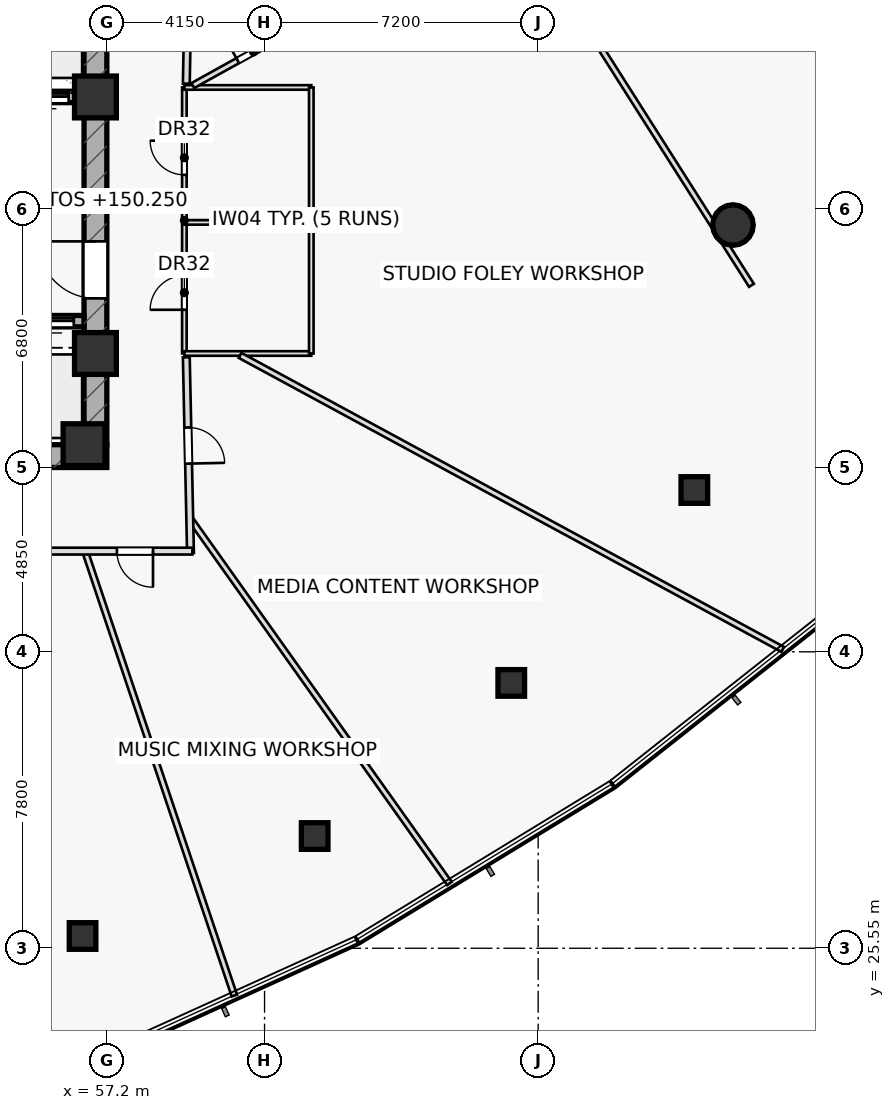
"""IFC4 building model, lengths in metres.
Left out: names, types, materials, properties, quantities, classifications, styles, units other than length and angle.
Written with IfcOpenShell. Run it as: python <this file> out.ifc"""

import sys

from ifc_helpers import new_model, si_unit, direction, frame, frame_2d, origin, origin_2d, place, context, subcontext, project, spatial, rectangle, hollow_rectangle, hollow_circle, extrude, element, fill, save


model = new_model("IFC4")
c1 = context("Model", 3, precision=1e-05, world=origin(), true_north=direction((0.0, 1.0)))
c2 = subcontext(c1, "Body", "Model", "MODEL_VIEW")
j1 = project(units=[si_unit("LENGTHUNIT", "METRE"), si_unit("PLANEANGLEUNIT", "RADIAN")], contexts=[c1])
p1 = place(None, origin())
s1 = spatial("IfcSite", under=j1, at=p1, CompositionType="ELEMENT")
p2 = place(p1, origin())
s2 = spatial("IfcBuilding", under=s1, at=p2, CompositionType="ELEMENT")
p3 = place(p2, frame((0.0, 0.0, 150.25)))
s3 = spatial("IfcBuildingStorey", under=s2, at=p3, CompositionType="ELEMENT", Elevation=150.25)
p4 = place(p3, frame((42.8, 38.5, 0.0), z_axis=(0.0, 0.0, 1.0), x_axis=(1.0, 0.0, 0.0)))
e1 = element("IfcWall", 1, at=p4, inside=s3, PredefinedType="SHEAR", context=c2, shape_type="SweptSolid", body=[
    extrude(rectangle(XDim=14.4, YDim=0.6, at=frame_2d((7.2, 0.0))), origin(), (0.0, 0.0, 1.0), 3.55),
])
p5 = place(p4, frame((0.88, 0.0, 0.0)))
e2 = element("IfcOpeningElement", 2, at=p5, cuts=e1, PredefinedType="OPENING", context=c2, shape_type="SweptSolid", body=[
    extrude(rectangle(XDim=1.05, YDim=2.2, at=frame_2d((0.525, 1.1))), frame((0.0, 0.31, 0.0), z_axis=(0.0, -1.0, 0.0), x_axis=(1.0, 0.0, 0.0)), (0.0, 0.0, 1.0), 0.62),
])
p6 = place(p3, frame((56.9, 38.8, 0.0), z_axis=(0.0, 0.0, 1.0), x_axis=(0.0, 1.0, 0.0)))
e3 = element("IfcWall", 3, at=p6, inside=s3, PredefinedType="SHEAR", context=c2, shape_type="SweptSolid", body=[
    extrude(rectangle(XDim=12.4, YDim=0.6, at=frame_2d((6.2, 0.0))), origin(), (0.0, 0.0, 1.0), 3.55),
])
p7 = place(p6, frame((3.85, 0.0, 0.0)))
e4 = element("IfcOpeningElement", 4, at=p7, cuts=e3, PredefinedType="OPENING", context=c2, shape_type="SweptSolid", body=[
    extrude(rectangle(XDim=1.5, YDim=2.2, at=frame_2d((0.75, 1.1))), frame((0.0, 0.31, 0.0), z_axis=(0.0, -1.0, 0.0), x_axis=(1.0, 0.0, 0.0)), (0.0, 0.0, 1.0), 0.62),
])
p8 = place(p3, frame((43.4, 47.95, 0.0), z_axis=(0.0, 0.0, 1.0), x_axis=(1.0, 0.0, 0.0)))
e5 = element("IfcWall", 5, at=p8, inside=s3, PredefinedType="SHEAR", context=c2, shape_type="SweptSolid", body=[
    extrude(rectangle(XDim=13.2, YDim=0.3, at=frame_2d((6.6, 0.0))), origin(), (0.0, 0.0, 1.0), 3.55),
])
p9 = place(p8, frame((8.345, 0.0, 0.0)))
e6 = element("IfcOpeningElement", 6, at=p9, cuts=e5, PredefinedType="OPENING", context=c2, shape_type="SweptSolid", body=[
    extrude(rectangle(XDim=1.15, YDim=2.2, at=frame_2d((0.575, 1.1))), frame((0.0, 0.16, 0.0), z_axis=(0.0, -1.0, 0.0), x_axis=(1.0, 0.0, 0.0)), (0.0, 0.0, 1.0), 0.32),
])
p10 = place(p8, frame((10.065, 0.0, 0.0)))
e7 = element("IfcOpeningElement", 7, at=p10, cuts=e5, PredefinedType="OPENING", context=c2, shape_type="SweptSolid", body=[
    extrude(rectangle(XDim=1.15, YDim=2.2, at=frame_2d((0.575, 1.1))), frame((0.0, 0.16, 0.0), z_axis=(0.0, -1.0, 0.0), x_axis=(1.0, 0.0, 0.0)), (0.0, 0.0, 1.0), 0.32),
])
p11 = place(p8, frame((11.645, 0.0, 0.0)))
e8 = element("IfcOpeningElement", 8, at=p11, cuts=e5, PredefinedType="OPENING", context=c2, shape_type="SweptSolid", body=[
    extrude(rectangle(XDim=1.15, YDim=2.2, at=frame_2d((0.575, 1.1))), frame((0.0, 0.16, 0.0), z_axis=(0.0, -1.0, 0.0), x_axis=(1.0, 0.0, 0.0)), (0.0, 0.0, 1.0), 0.32),
])
p12 = place(p3, frame((43.4, 42.05, 0.0), z_axis=(0.0, 0.0, 1.0), x_axis=(1.0, 0.0, 0.0)))
e9 = element("IfcWall", 9, at=p12, inside=s3, PredefinedType="SHEAR", context=c2, shape_type="SweptSolid", body=[
    extrude(rectangle(XDim=13.2, YDim=0.3, at=frame_2d((6.6, 0.0))), origin(), (0.0, 0.0, 1.0), 3.55),
])
p13 = place(p12, frame((8.37, 0.0, 0.0)))
e10 = element("IfcOpeningElement", 10, at=p13, cuts=e9, PredefinedType="OPENING", context=c2, shape_type="SweptSolid", body=[
    extrude(rectangle(XDim=1.1, YDim=2.15, at=frame_2d((0.55, 1.075))), frame((0.0, 0.16, 0.0), z_axis=(0.0, -1.0, 0.0), x_axis=(1.0, 0.0, 0.0)), (0.0, 0.0, 1.0), 0.32),
])
p14 = place(p12, frame((10.09, 0.0, 0.0)))
e11 = element("IfcOpeningElement", 11, at=p14, cuts=e9, PredefinedType="OPENING", context=c2, shape_type="SweptSolid", body=[
    extrude(rectangle(XDim=1.1, YDim=2.15, at=frame_2d((0.55, 1.075))), frame((0.0, 0.16, 0.0), z_axis=(0.0, -1.0, 0.0), x_axis=(1.0, 0.0, 0.0)), (0.0, 0.0, 1.0), 0.32),
])
p15 = place(p12, frame((11.83, 0.0, 0.0)))
e12 = element("IfcOpeningElement", 12, at=p15, cuts=e9, PredefinedType="OPENING", context=c2, shape_type="SweptSolid", body=[
    extrude(rectangle(XDim=1.1, YDim=2.15, at=frame_2d((0.55, 1.075))), frame((0.0, 0.16, 0.0), z_axis=(0.0, -1.0, 0.0), x_axis=(1.0, 0.0, 0.0)), (0.0, 0.0, 1.0), 0.32),
])
for number, where, z_axis, x_axis in (
    (13, (56.9, 47.95, 0.0), (0.0, 0.0, 1.0), (1.0, 0.0, 0.0)),
    (14, (56.9, 41.2, 0.0), (0.0, 0.0, 1.0), (1.0, 0.0, 0.0)),
    (15, (56.6, 38.8, 0.0), (0.0, 0.0, 1.0), (1.0, 0.0, 0.0)),
):
    element("IfcColumn", number, at=place(p3, frame(where, z_axis=z_axis, x_axis=x_axis)), inside=s3, PredefinedType="COLUMN", context=c2, shape_type="SweptSolid", body=[
        extrude(rectangle(XDim=1.1, YDim=1.1, at=origin_2d()), origin(), (0.0, 0.0, 1.0), 3.55),
    ])
for number, where, z_axis, x_axis in (
    (16, (56.561, 25.873, 0.0), (0.0, 0.0, 1.0), (1.0, 0.0, 0.0)),
    (17, (62.669, 28.503, 0.0), (0.0, 0.0, 1.0), (1.0, 0.0, 0.0)),
    (18, (67.842, 32.532, 0.0), (0.0, 0.0, 1.0), (1.0, 0.0, 0.0)),
    (19, (72.659, 37.607, 0.0), (0.0, 0.0, 1.0), (1.0, 0.0, 0.0)),
):
    element("IfcColumn", number, at=place(p3, frame(where, z_axis=z_axis, x_axis=x_axis)), inside=s3, PredefinedType="COLUMN", context=c2, shape_type="SweptSolid", body=[
        extrude(hollow_rectangle(XDim=0.7, YDim=0.7, WallThickness=0.04, at=origin_2d()), origin(), (0.0, 0.0, 1.0), 3.55),
    ])
p16 = place(p3, frame((73.676, 44.58, 0.0), z_axis=(0.0, 0.0, 1.0), x_axis=(1.0, 0.0, 0.0)))
e20 = element("IfcColumn", 20, at=p16, inside=s3, PredefinedType="COLUMN", context=c2, shape_type="SweptSolid", body=[
    extrude(hollow_circle(Radius=0.533, WallThickness=0.045, at=origin_2d()), origin(), (0.0, 0.0, 1.0), 3.55),
])
p17 = place(p3, frame((50.65, 45.05, 0.0), z_axis=(0.0, 0.0, 1.0), x_axis=(1.0, 0.0, 0.0)))
e21 = element("IfcWall", 21, at=p17, inside=s3, PredefinedType="PARTITIONING", context=c2, shape_type="SweptSolid", body=[
    extrude(rectangle(XDim=5.95, YDim=0.2, at=frame_2d((2.975, 0.0))), origin(), (0.0, 0.0, 1.0), 3.55),
])
p18 = place(p17, frame((1.35, 0.0, 0.0)))
e22 = element("IfcOpeningElement", 22, at=p18, cuts=e21, PredefinedType="OPENING", context=c2, shape_type="SweptSolid", body=[
    extrude(rectangle(XDim=1.5, YDim=2.2, at=frame_2d((0.75, 1.1))), frame((0.0, 0.11, 0.0), z_axis=(0.0, -1.0, 0.0), x_axis=(1.0, 0.0, 0.0)), (0.0, 0.0, 1.0), 0.22),
])
p19 = place(p3, frame((74.163, 42.993, 0.0), z_axis=(0.0, 0.0, 1.0), x_axis=(-0.53628142437, 0.844039237166, 0.0)))
e23 = element("IfcWall", 23, at=p19, inside=s3, PredefinedType="PARTITIONING", context=c2, shape_type="SweptSolid", body=[
    extrude(rectangle(XDim=10.267, YDim=0.15, at=frame_2d((5.133, 0.0))), origin(), (0.0, 0.0, 1.0), 2.835),
])
p20 = place(p3, frame((59.24, 41.2, 0.0), z_axis=(0.0, 0.0, 1.0), x_axis=(0.0, 1.0, 0.0)))
e24 = element("IfcWall", 24, at=p20, inside=s3, PredefinedType="PARTITIONING", context=c2, shape_type="SweptSolid", body=[
    extrude(rectangle(XDim=7.0, YDim=0.12, at=frame_2d((3.5, 0.0))), origin(), (0.0, 0.0, 1.0), 3.55),
])
p21 = place(p20, frame((1.15, 0.0, 0.0)))
e25 = element("IfcOpeningElement", 25, at=p21, cuts=e24, PredefinedType="OPENING", context=c2, shape_type="SweptSolid", body=[
    extrude(rectangle(XDim=0.9, YDim=2.05, at=frame_2d((0.45, 1.025))), frame((0.0, 0.07, 0.0), z_axis=(0.0, -1.0, 0.0), x_axis=(1.0, 0.0, 0.0)), (0.0, 0.0, 1.0), 0.14),
])
p22 = place(p20, frame((4.7, 0.0, 0.0)))
e26 = element("IfcOpeningElement", 26, at=p22, cuts=e24, PredefinedType="OPENING", context=c2, shape_type="SweptSolid", body=[
    extrude(rectangle(XDim=0.9, YDim=2.05, at=frame_2d((0.45, 1.025))), frame((0.0, 0.07, 0.0), z_axis=(0.0, -1.0, 0.0), x_axis=(1.0, 0.0, 0.0)), (0.0, 0.0, 1.0), 0.14),
])
for number, where, z_axis, x_axis in (
    (27, (59.24, 41.2, 0.0), (0.0, 0.0, 1.0), (1.0, 0.0, 0.0)),
    (28, (59.24, 44.65, 0.0), (0.0, 0.0, 1.0), (1.0, 0.0, 0.0)),
    (29, (59.24, 48.2, 0.0), (0.0, 0.0, 1.0), (1.0, 0.0, 0.0)),
):
    element("IfcWall", number, at=place(p3, frame(where, z_axis=z_axis, x_axis=x_axis)), inside=s3, PredefinedType="PARTITIONING", context=c2, shape_type="SweptSolid", body=[
        extrude(rectangle(XDim=3.34, YDim=0.12, at=frame_2d((1.67, 0.0))), origin(), (0.0, 0.0, 1.0), 3.55),
    ])
p23 = place(p3, frame((62.58, 41.2, 0.0), z_axis=(0.0, 0.0, 1.0), x_axis=(0.0, 1.0, 0.0)))
e30 = element("IfcWall", 30, at=p23, inside=s3, PredefinedType="PARTITIONING", context=c2, shape_type="SweptSolid", body=[
    extrude(rectangle(XDim=7.0, YDim=0.12, at=frame_2d((3.5, 0.0))), origin(), (0.0, 0.0, 1.0), 3.55),
])
p24 = place(p3, frame((59.463, 48.25, 0.0), z_axis=(0.0, 0.0, 1.0), x_axis=(0.87461815062, 0.48481242827, 0.0)))
e31 = element("IfcWall", 31, at=p24, inside=s3, PredefinedType="PARTITIONING", context=c2, shape_type="SweptSolid", body=[
    extrude(rectangle(XDim=17.901, YDim=0.15, at=frame_2d((8.95, 0.0))), origin(), (0.0, 0.0, 1.0), 2.835),
])
p25 = place(p24, frame((1.35, 0.0, 0.0)))
e32 = element("IfcOpeningElement", 32, at=p25, cuts=e31, PredefinedType="OPENING", context=c2, shape_type="SweptSolid", body=[
    extrude(rectangle(XDim=0.95, YDim=2.05, at=frame_2d((0.475, 1.025))), frame((0.0, 0.085, 0.0), z_axis=(0.0, -1.0, 0.0), x_axis=(1.0, 0.0, 0.0)), (0.0, 0.0, 1.0), 0.17),
])
p26 = place(p3, frame((56.625, 36.0, 0.0), z_axis=(0.0, 0.0, 1.0), x_axis=(0.318583516761, -0.947894795243, 0.0)))
e33 = element("IfcWall", 33, at=p26, inside=s3, PredefinedType="PARTITIONING", context=c2, shape_type="SweptSolid", body=[
    extrude(rectangle(XDim=12.338, YDim=0.15, at=frame_2d((6.169, 0.0))), origin(), (0.0, 0.0, 1.0), 2.835),
])
p27 = place(p3, frame((59.381, 36.869, 0.0), z_axis=(0.0, 0.0, 1.0), x_axis=(0.579466969075, -0.814995724989, 0.0)))
e34 = element("IfcWall", 34, at=p27, inside=s3, PredefinedType="PARTITIONING", context=c2, shape_type="SweptSolid", body=[
    extrude(rectangle(XDim=11.796, YDim=0.15, at=frame_2d((5.898, 0.0))), origin(), (0.0, 0.0, 1.0), 2.975),
])
p28 = place(p3, frame((60.706, 41.15, 0.0), z_axis=(0.0, 0.0, 1.0), x_axis=(0.879232941784, -0.476392101195, 0.0)))
e35 = element("IfcWall", 35, at=p28, inside=s3, PredefinedType="PARTITIONING", context=c2, shape_type="SweptSolid", body=[
    extrude(rectangle(XDim=16.241, YDim=0.15, at=frame_2d((8.121, 0.0))), origin(), (0.0, 0.0, 1.0), 2.835),
])
p29 = place(p3, frame((59.401, 54.05, 0.0), z_axis=(0.0, 0.0, 1.0), x_axis=(-0.019103170983, -0.999817517779, 0.0)))
e36 = element("IfcWall", 36, at=p29, inside=s3, PredefinedType="PARTITIONING", context=c2, shape_type="SweptSolid", body=[
    extrude(rectangle(XDim=5.751, YDim=0.18, at=frame_2d((2.875, 0.0))), origin(), (0.0, 0.0, 1.0), 2.835),
])
p30 = place(p29, frame((2.4, 0.0, 0.0)))
e37 = element("IfcOpeningElement", 37, at=p30, cuts=e36, PredefinedType="OPENING", context=c2, shape_type="SweptSolid", body=[
    extrude(rectangle(XDim=0.95, YDim=2.05, at=frame_2d((0.475, 1.025))), frame((0.0, 0.1, 0.0), z_axis=(0.0, -1.0, 0.0), x_axis=(1.0, 0.0, 0.0)), (0.0, 0.0, 1.0), 0.2),
])
p31 = place(p3, frame((59.291, 41.1, 0.0), z_axis=(0.0, 0.0, 1.0), x_axis=(0.021374589398, -0.999771537366, 0.0)))
e38 = element("IfcWall", 38, at=p31, inside=s3, PredefinedType="PARTITIONING", context=c2, shape_type="SweptSolid", body=[
    extrude(rectangle(XDim=5.151, YDim=0.18, at=frame_2d((2.576, 0.0))), origin(), (0.0, 0.0, 1.0), 2.835),
])
p32 = place(p31, frame((1.849, 0.0, 0.0)))
e39 = element("IfcOpeningElement", 39, at=p32, cuts=e38, PredefinedType="OPENING", context=c2, shape_type="SweptSolid", body=[
    extrude(rectangle(XDim=0.95, YDim=2.05, at=frame_2d((0.475, 1.025))), frame((0.0, 0.1, 0.0), z_axis=(0.0, -1.0, 0.0), x_axis=(1.0, 0.0, 0.0)), (0.0, 0.0, 1.0), 0.2),
])
p33 = place(p3, frame((59.45, 36.0, 0.0), z_axis=(0.0, 0.0, 1.0), x_axis=(-1.0, 0.0, 0.0)))
e40 = element("IfcWall", 40, at=p33, inside=s3, PredefinedType="PARTITIONING", context=c2, shape_type="SweptSolid", body=[
    extrude(rectangle(XDim=19.7, YDim=0.18, at=frame_2d((9.85, 0.0))), origin(), (0.0, 0.0, 1.0), 2.835),
])
p34 = place(p33, frame((1.035, 0.0, 0.0)))
e41 = element("IfcOpeningElement", 41, at=p34, cuts=e40, PredefinedType="OPENING", context=c2, shape_type="SweptSolid", body=[
    extrude(rectangle(XDim=0.95, YDim=2.05, at=frame_2d((0.475, 1.025))), frame((0.0, 0.1, 0.0), z_axis=(0.0, -1.0, 0.0), x_axis=(1.0, 0.0, 0.0)), (0.0, 0.0, 1.0), 0.2),
])
p35 = place(p33, frame((5.885, 0.0, 0.0)))
e42 = element("IfcOpeningElement", 42, at=p35, cuts=e40, PredefinedType="OPENING", context=c2, shape_type="SweptSolid", body=[
    extrude(rectangle(XDim=0.95, YDim=2.05, at=frame_2d((0.475, 1.025))), frame((0.0, 0.1, 0.0), z_axis=(0.0, -1.0, 0.0), x_axis=(1.0, 0.0, 0.0)), (0.0, 0.0, 1.0), 0.2),
])
p36 = place(p33, frame((10.567, 0.0, 0.0)))
e43 = element("IfcOpeningElement", 43, at=p36, cuts=e40, PredefinedType="OPENING", context=c2, shape_type="SweptSolid", body=[
    extrude(rectangle(XDim=0.95, YDim=2.05, at=frame_2d((0.475, 1.025))), frame((0.0, 0.1, 0.0), z_axis=(0.0, -1.0, 0.0), x_axis=(1.0, 0.0, 0.0)), (0.0, 0.0, 1.0), 0.2),
])
p37 = place(p33, frame((15.343, 0.0, 0.0)))
e44 = element("IfcOpeningElement", 44, at=p37, cuts=e40, PredefinedType="OPENING", context=c2, shape_type="SweptSolid", body=[
    extrude(rectangle(XDim=0.95, YDim=2.05, at=frame_2d((0.475, 1.025))), frame((0.0, 0.1, 0.0), z_axis=(0.0, -1.0, 0.0), x_axis=(1.0, 0.0, 0.0)), (0.0, 0.0, 1.0), 0.2),
])
p38 = place(p7, origin())
e45 = element("IfcDoor", 45, at=p38, inside=s3, OperationType="SINGLE_SWING_RIGHT", PredefinedType="DOOR", context=c2, shape_type="SweptSolid", body=[
    extrude(rectangle(XDim=1.5, YDim=2.2, at=frame_2d((0.75, 1.1))), frame((0.0, 0.025, 0.0), z_axis=(0.0, -1.0, 0.0), x_axis=(1.0, 0.0, 0.0)), (0.0, 0.0, 1.0), 0.05),
])
fill(e4, e45)
p39 = place(p21, origin())
e46 = element("IfcDoor", 46, at=p39, inside=s3, OperationType="SINGLE_SWING_LEFT", PredefinedType="DOOR", context=c2, shape_type="SweptSolid", body=[
    extrude(rectangle(XDim=0.9, YDim=2.05, at=frame_2d((0.45, 1.025))), frame((0.0, 0.025, 0.0), z_axis=(0.0, -1.0, 0.0), x_axis=(1.0, 0.0, 0.0)), (0.0, 0.0, 1.0), 0.05),
])
fill(e25, e46)
p40 = place(p22, origin())
e47 = element("IfcDoor", 47, at=p40, inside=s3, OperationType="SINGLE_SWING_RIGHT", PredefinedType="DOOR", context=c2, shape_type="SweptSolid", body=[
    extrude(rectangle(XDim=0.9, YDim=2.05, at=frame_2d((0.45, 1.025))), frame((0.0, 0.025, 0.0), z_axis=(0.0, -1.0, 0.0), x_axis=(1.0, 0.0, 0.0)), (0.0, 0.0, 1.0), 0.05),
])
fill(e26, e47)
p41 = place(p25, origin())
e48 = element("IfcDoor", 48, at=p41, inside=s3, OperationType="SINGLE_SWING_LEFT", PredefinedType="DOOR", context=c2, shape_type="SweptSolid", body=[
    extrude(rectangle(XDim=0.95, YDim=2.05, at=frame_2d((0.475, 1.025))), frame((0.0, 0.025, 0.0), z_axis=(0.0, -1.0, 0.0), x_axis=(1.0, 0.0, 0.0)), (0.0, 0.0, 1.0), 0.05),
])
fill(e32, e48)
p42 = place(p32, origin())
e49 = element("IfcDoor", 49, at=p42, inside=s3, OperationType="SINGLE_SWING_RIGHT", PredefinedType="DOOR", context=c2, shape_type="SweptSolid", body=[
    extrude(rectangle(XDim=0.95, YDim=2.05, at=frame_2d((0.475, 1.025))), frame((0.0, 0.025, 0.0), z_axis=(0.0, -1.0, 0.0), x_axis=(1.0, 0.0, 0.0)), (0.0, 0.0, 1.0), 0.05),
])
fill(e39, e49)
p43 = place(p34, origin())
e50 = element("IfcDoor", 50, at=p43, inside=s3, OperationType="SINGLE_SWING_LEFT", PredefinedType="DOOR", context=c2, shape_type="SweptSolid", body=[
    extrude(rectangle(XDim=0.95, YDim=2.05, at=frame_2d((0.475, 1.025))), frame((0.0, 0.025, 0.0), z_axis=(0.0, -1.0, 0.0), x_axis=(1.0, 0.0, 0.0)), (0.0, 0.0, 1.0), 0.05),
])
fill(e41, e50)
p44 = place(p11, origin())
e51 = element("IfcDoor", 51, at=p44, inside=s3, OperationType="SLIDING_TO_LEFT", PredefinedType="DOOR", context=c2, shape_type="SweptSolid", body=[
    extrude(rectangle(XDim=1.15, YDim=2.2, at=frame_2d((0.575, 1.1))), frame((0.0, 0.025, 0.0), z_axis=(0.0, -1.0, 0.0), x_axis=(1.0, 0.0, 0.0)), (0.0, 0.0, 1.0), 0.05),
])
fill(e8, e51)
p45 = place(p15, origin())
e52 = element("IfcDoor", 52, at=p45, inside=s3, OperationType="SLIDING_TO_LEFT", PredefinedType="DOOR", context=c2, shape_type="SweptSolid", body=[
    extrude(rectangle(XDim=1.1, YDim=2.15, at=frame_2d((0.55, 1.075))), frame((0.0, 0.025, 0.0), z_axis=(0.0, -1.0, 0.0), x_axis=(1.0, 0.0, 0.0)), (0.0, 0.0, 1.0), 0.05),
])
fill(e12, e52)
save(model, sys.argv[1])
